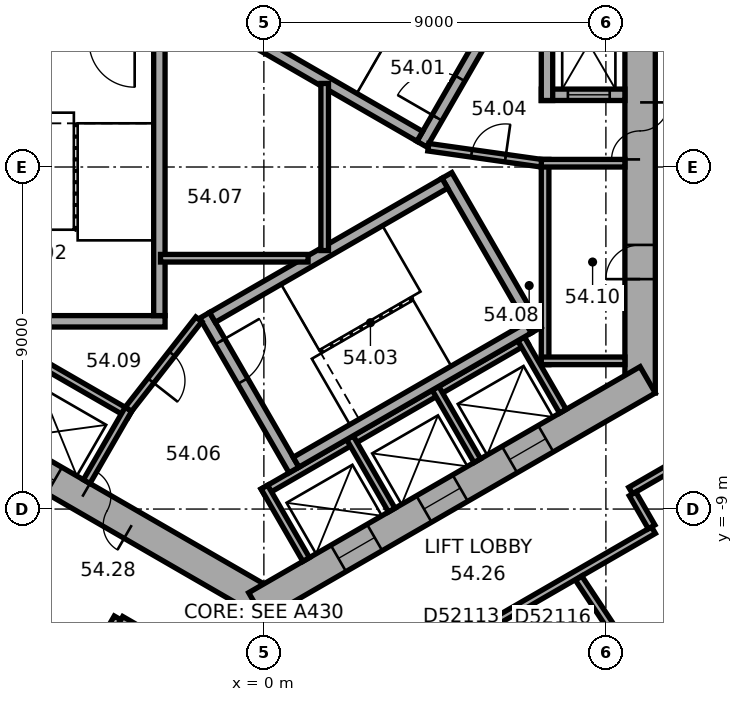
"""IFC4 building model, lengths in metres.
Left out: names, types, materials, properties, quantities, classifications, styles, units other than length and angle.
Written with IfcOpenShell. Run it as: python <this file> out.ifc"""

import sys

from ifc_helpers import new_model, si_unit, direction, frame, frame_2d, origin, place, context, subcontext, project, spatial, rectangle, extrude, element, fill, save


model = new_model("IFC4")
c1 = context("Model", 3, precision=1e-05, world=origin(), true_north=direction((0.0, 1.0)))
c2 = subcontext(c1, "Body", "Model", "MODEL_VIEW")
j1 = project(units=[si_unit("LENGTHUNIT", "METRE"), si_unit("PLANEANGLEUNIT", "RADIAN")], contexts=[c1])
p1 = place(None, origin())
s1 = spatial("IfcSite", under=j1, at=p1, CompositionType="ELEMENT")
p2 = place(p1, origin())
s2 = spatial("IfcBuilding", under=s1, at=p2, CompositionType="ELEMENT")
p3 = place(p2, frame((0.0, 0.0, 221.7)))
s3 = spatial("IfcBuildingStorey", under=s2, at=p3, CompositionType="ELEMENT", Elevation=221.7)
p4 = place(p3, frame((9.9, -5.947, 0.0), z_axis=(0.0, 0.0, 1.0), x_axis=(0.0, 1.0, 0.0)))
e1 = element("IfcWall", 1, at=p4, inside=s3, PredefinedType="SHEAR", context=c2, shape_type="SweptSolid", body=[
    extrude(rectangle(XDim=11.894, YDim=0.8, at=frame_2d((5.947, 0.0))), origin(), (0.0, 0.0, 1.0), 3.7),
])
p5 = place(p4, frame((6.147, 0.0, 0.0)))
e2 = element("IfcOpeningElement", 2, at=p5, cuts=e1, PredefinedType="OPENING", context=c2, shape_type="SweptSolid", body=[
    extrude(rectangle(XDim=1.5, YDim=2.1, at=frame_2d((0.75, 1.05))), frame((0.0, 0.41, 0.0), z_axis=(0.0, -1.0, 0.0), x_axis=(1.0, 0.0, 0.0)), (0.0, 0.0, 1.0), 0.82),
])
p6 = place(p4, frame((2.997, 0.0, 0.0)))
e3 = element("IfcOpeningElement", 3, at=p6, cuts=e1, PredefinedType="OPENING", context=c2, shape_type="SweptSolid", body=[
    extrude(rectangle(XDim=0.9, YDim=2.1, at=frame_2d((0.45, 1.05))), frame((0.0, 0.41, 0.0), z_axis=(0.0, -1.0, 0.0), x_axis=(1.0, 0.0, 0.0)), (0.0, 0.0, 1.0), 0.82),
])
p7 = place(p3, frame((-10.1, -5.6, 0.0), z_axis=(0.0, 0.0, 1.0), x_axis=(0.866023897231, -0.500002609418, 0.0)))
e4 = element("IfcWall", 4, at=p7, inside=s3, PredefinedType="SHEAR", context=c2, shape_type="SweptSolid", body=[
    extrude(rectangle(XDim=11.894, YDim=0.8, at=frame_2d((5.947, 0.0))), origin(), (0.0, 0.0, 1.0), 3.7),
])
p8 = place(p7, frame((6.147, 0.0, 0.0)))
e5 = element("IfcOpeningElement", 5, at=p8, cuts=e4, PredefinedType="OPENING", context=c2, shape_type="SweptSolid", body=[
    extrude(rectangle(XDim=1.5, YDim=2.1, at=frame_2d((0.75, 1.05))), frame((0.0, 0.41, 0.0), z_axis=(0.0, -1.0, 0.0), x_axis=(1.0, 0.0, 0.0)), (0.0, 0.0, 1.0), 0.82),
])
p9 = place(p7, frame((1.597, 0.0, 0.0)))
e6 = element("IfcOpeningElement", 6, at=p9, cuts=e4, PredefinedType="OPENING", context=c2, shape_type="SweptSolid", body=[
    extrude(rectangle(XDim=1.1, YDim=2.1, at=frame_2d((0.55, 1.05))), frame((0.0, 0.41, 0.0), z_axis=(0.0, -1.0, 0.0), x_axis=(1.0, 0.0, 0.0)), (0.0, 0.0, 1.0), 0.82),
])
p10 = place(p7, frame((4.197, 0.0, 0.0)))
e7 = element("IfcOpeningElement", 7, at=p10, cuts=e4, PredefinedType="OPENING", context=c2, shape_type="SweptSolid", body=[
    extrude(rectangle(XDim=1.1, YDim=2.1, at=frame_2d((0.55, 1.05))), frame((0.0, 0.41, 0.0), z_axis=(0.0, -1.0, 0.0), x_axis=(1.0, 0.0, 0.0)), (0.0, 0.0, 1.0), 0.82),
])
p11 = place(p3, frame((-0.2, -11.547, 0.0), z_axis=(0.0, 0.0, 1.0), x_axis=(0.866023897231, 0.500002609418, 0.0)))
e8 = element("IfcWall", 8, at=p11, inside=s3, PredefinedType="SHEAR", context=c2, shape_type="SweptSolid", body=[
    extrude(rectangle(XDim=11.894, YDim=0.8, at=frame_2d((5.947, 0.0))), origin(), (0.0, 0.0, 1.0), 3.7),
])
p12 = place(p11, frame((2.497, 0.0, 0.0)))
e9 = element("IfcOpeningElement", 9, at=p12, cuts=e8, PredefinedType="OPENING", context=c2, shape_type="SweptSolid", body=[
    extrude(rectangle(XDim=1.1, YDim=2.1, at=frame_2d((0.55, 1.05))), frame((0.0, 0.41, 0.0), z_axis=(0.0, -1.0, 0.0), x_axis=(1.0, 0.0, 0.0)), (0.0, 0.0, 1.0), 0.82),
])
p13 = place(p11, frame((5.097, 0.0, 0.0)))
e10 = element("IfcOpeningElement", 10, at=p13, cuts=e8, PredefinedType="OPENING", context=c2, shape_type="SweptSolid", body=[
    extrude(rectangle(XDim=1.1, YDim=2.1, at=frame_2d((0.55, 1.05))), frame((0.0, 0.41, 0.0), z_axis=(0.0, -1.0, 0.0), x_axis=(1.0, 0.0, 0.0)), (0.0, 0.0, 1.0), 0.82),
])
p14 = place(p11, frame((7.697, 0.0, 0.0)))
e11 = element("IfcOpeningElement", 11, at=p14, cuts=e8, PredefinedType="OPENING", context=c2, shape_type="SweptSolid", body=[
    extrude(rectangle(XDim=1.1, YDim=2.1, at=frame_2d((0.55, 1.05))), frame((0.0, 0.41, 0.0), z_axis=(0.0, -1.0, 0.0), x_axis=(1.0, 0.0, 0.0)), (0.0, 0.0, 1.0), 0.82),
])
p15 = place(p3, frame((7.4, -5.2, 0.0), z_axis=(0.0, 0.0, 1.0), x_axis=(0.0, 1.0, 0.0)))
e12 = element("IfcWall", 12, at=p15, inside=s3, PredefinedType="PARTITIONING", context=c2, shape_type="SweptSolid", body=[
    extrude(rectangle(XDim=5.4, YDim=0.2, at=frame_2d((2.7, 0.0))), origin(), (0.0, 0.0, 1.0), 3.42),
])
for number, where, z_axis, x_axis in (
    (13, (7.3, -5.1, 0.0), (0.0, 0.0, 1.0), (1.0, 0.0, 0.0)),
    (14, (7.3, 0.1, 0.0), (0.0, 0.0, 1.0), (1.0, 0.0, 0.0)),
):
    element("IfcWall", number, at=place(p3, frame(where, z_axis=z_axis, x_axis=x_axis)), inside=s3, PredefinedType="PARTITIONING", context=c2, shape_type="SweptSolid", body=[
        extrude(rectangle(XDim=2.2, YDim=0.2, at=frame_2d((1.1, 0.0))), origin(), (0.0, 0.0, 1.0), 3.42),
    ])
p16 = place(p3, frame((-8.203, -3.809, 0.0), z_axis=(0.0, 0.0, 1.0), x_axis=(0.866028230842, -0.499995103361, 0.0)))
e15 = element("IfcWall", 15, at=p16, inside=s3, PredefinedType="PARTITIONING", context=c2, shape_type="SweptSolid", body=[
    extrude(rectangle(XDim=5.4, YDim=0.2, at=frame_2d((2.7, 0.0))), origin(), (0.0, 0.0, 1.0), 3.42),
])
p17 = place(p3, frame((-3.563, -6.372, 0.0), z_axis=(0.0, 0.0, 1.0), x_axis=(-0.499994660107, -0.866028486751, 0.0)))
e16 = element("IfcWall", 16, at=p17, inside=s3, PredefinedType="PARTITIONING", context=c2, shape_type="SweptSolid", body=[
    extrude(rectangle(XDim=2.2, YDim=0.2, at=frame_2d((1.1, 0.0))), origin(), (0.0, 0.0, 1.0), 3.42),
])
p18 = place(p3, frame((-0.024, -8.559, 0.0), z_axis=(0.0, 0.0, 1.0), x_axis=(0.866026010844, 0.49999894854, 0.0)))
e17 = element("IfcWall", 17, at=p18, inside=s3, PredefinedType="PARTITIONING", context=c2, shape_type="SweptSolid", body=[
    extrude(rectangle(XDim=8.0, YDim=0.2, at=frame_2d((4.0, 0.0))), origin(), (0.0, 0.0, 1.0), 3.42),
])
for number, where, z_axis, x_axis in (
    (18, (0.013, -8.422, 0.0), (0.0, 0.0, 1.0), (0.5, -0.866, 0.0)),
    (19, (2.264, -7.122, 0.0), (0.0, 0.0, 1.0), (0.5, -0.866, 0.0)),
    (20, (4.516, -5.822, 0.0), (0.0, 0.0, 1.0), (0.5, -0.866, 0.0)),
    (21, (6.768, -4.522, 0.0), (0.0, 0.0, 1.0), (0.5, -0.866, 0.0)),
):
    element("IfcWall", number, at=place(p3, frame(where, z_axis=z_axis, x_axis=x_axis)), inside=s3, PredefinedType="PARTITIONING", context=c2, shape_type="SweptSolid", body=[
        extrude(rectangle(XDim=2.2, YDim=0.2, at=frame_2d((1.1, 0.0))), origin(), (0.0, 0.0, 1.0), 3.42),
    ])
p19 = place(p3, frame((4.158, 0.602, 0.0), z_axis=(0.0, 0.0, 1.0), x_axis=(0.499977259774, 0.866038532462, 0.0)))
e22 = element("IfcWall", 22, at=p19, inside=s3, PredefinedType="SHEAR", context=c2, shape_type="SweptSolid", body=[
    extrude(rectangle(XDim=4.7, YDim=0.3, at=frame_2d((2.35, 0.0))), origin(), (0.0, 0.0, 1.0), 3.42),
])
p20 = place(p19, frame((0.8, 0.0, 0.0)))
e23 = element("IfcOpeningElement", 23, at=p20, cuts=e22, PredefinedType="OPENING", context=c2, shape_type="SweptSolid", body=[
    extrude(rectangle(XDim=1.2, YDim=2.1, at=frame_2d((0.6, 1.05))), frame((0.0, 0.16, 0.0), z_axis=(0.0, -1.0, 0.0), x_axis=(1.0, 0.0, 0.0)), (0.0, 0.0, 1.0), 0.32),
])
p21 = place(p3, frame((4.103, 0.807, 0.0), z_axis=(0.0, 0.0, 1.0), x_axis=(-0.866027801685, 0.499995846692, 0.0)))
e24 = element("IfcWall", 24, at=p21, inside=s3, PredefinedType="SHEAR", context=c2, shape_type="SweptSolid", body=[
    extrude(rectangle(XDim=7.06, YDim=0.3, at=frame_2d((3.53, 0.0))), origin(), (0.0, 0.0, 1.0), 3.42),
])
p22 = place(p3, frame((-2.6, -4.06, 0.0), z_axis=(0.0, 0.0, 1.0), x_axis=(-1.0, 0.0, 0.0)))
e25 = element("IfcWall", 25, at=p22, inside=s3, PredefinedType="SHEAR", context=c2, shape_type="SweptSolid", body=[
    extrude(rectangle(XDim=4.7, YDim=0.3, at=frame_2d((2.35, 0.0))), origin(), (0.0, 0.0, 1.0), 3.42),
])
p23 = place(p3, frame((-2.75, 3.15, 0.0), z_axis=(0.0, 0.0, 1.0), x_axis=(0.0, -1.0, 0.0)))
e26 = element("IfcWall", 26, at=p23, inside=s3, PredefinedType="SHEAR", context=c2, shape_type="SweptSolid", body=[
    extrude(rectangle(XDim=7.06, YDim=0.3, at=frame_2d((3.53, 0.0))), origin(), (0.0, 0.0, 1.0), 3.42),
])
p24 = place(p3, frame((-1.558, -3.902, 0.0), z_axis=(0.0, 0.0, 1.0), x_axis=(0.499977259774, -0.866038532462, 0.0)))
e27 = element("IfcWall", 27, at=p24, inside=s3, PredefinedType="SHEAR", context=c2, shape_type="SweptSolid", body=[
    extrude(rectangle(XDim=4.7, YDim=0.3, at=frame_2d((2.35, 0.0))), origin(), (0.0, 0.0, 1.0), 3.42),
])
p25 = place(p24, frame((0.8, 0.0, 0.0)))
e28 = element("IfcOpeningElement", 28, at=p25, cuts=e27, PredefinedType="OPENING", context=c2, shape_type="SweptSolid", body=[
    extrude(rectangle(XDim=1.2, YDim=2.1, at=frame_2d((0.6, 1.05))), frame((0.0, 0.16, 0.0), z_axis=(0.0, -1.0, 0.0), x_axis=(1.0, 0.0, 0.0)), (0.0, 0.0, 1.0), 0.32),
])
p26 = place(p3, frame((4.816, -0.222, 0.0), z_axis=(0.0, 0.0, 1.0), x_axis=(0.499977259774, -0.866038532462, 0.0)))
e29 = element("IfcWall", 29, at=p26, inside=s3, PredefinedType="SHEAR", context=c2, shape_type="SweptSolid", body=[
    extrude(rectangle(XDim=4.7, YDim=0.3, at=frame_2d((2.35, 0.0))), origin(), (0.0, 0.0, 1.0), 3.42),
])
for number, where, z_axis, x_axis in (
    (30, (-1.353, -3.957, 0.0), (0.0, 0.0, 1.0), (0.866, 0.5, 0.0)),
    (31, (0.847, -7.767, 0.0), (0.0, 0.0, 1.0), (0.866, 0.5, 0.0)),
):
    element("IfcWall", number, at=place(p3, frame(where, z_axis=z_axis, x_axis=x_axis)), inside=s3, PredefinedType="SHEAR", context=c2, shape_type="SweptSolid", body=[
        extrude(rectangle(XDim=7.06, YDim=0.3, at=frame_2d((3.53, 0.0))), origin(), (0.0, 0.0, 1.0), 3.42),
    ])
p27 = place(p3, frame((7.3, 1.9, 0.0), z_axis=(0.0, 0.0, 1.0), x_axis=(1.0, 0.0, 0.0)))
e32 = element("IfcWall", 32, at=p27, inside=s3, PredefinedType="SHEAR", context=c2, shape_type="SweptSolid", body=[
    extrude(rectangle(XDim=2.2, YDim=0.3, at=frame_2d((1.1, 0.0))), origin(), (0.0, 0.0, 1.0), 3.42),
])
p28 = place(p27, frame((0.7, 0.0, 0.0)))
e33 = element("IfcOpeningElement", 33, at=p28, cuts=e32, PredefinedType="OPENING", context=c2, shape_type="SweptSolid", body=[
    extrude(rectangle(XDim=1.1, YDim=2.1, at=frame_2d((0.55, 1.05))), frame((0.0, 0.16, 0.0), z_axis=(0.0, -1.0, 0.0), x_axis=(1.0, 0.0, 0.0)), (0.0, 0.0, 1.0), 0.32),
])
p29 = place(p3, frame((7.45, 1.75, 0.0), z_axis=(0.0, 0.0, 1.0), x_axis=(0.0, 1.0, 0.0)))
e34 = element("IfcWall", 34, at=p29, inside=s3, PredefinedType="SHEAR", context=c2, shape_type="SweptSolid", body=[
    extrude(rectangle(XDim=3.35, YDim=0.3, at=frame_2d((1.675, 0.0))), origin(), (0.0, 0.0, 1.0), 3.42),
])
p30 = place(p3, frame((4.327, 0.521, 0.0), z_axis=(0.0, 0.0, 1.0), x_axis=(0.990124376366, -0.14019172346, 0.0)))
e35 = element("IfcWall", 35, at=p30, inside=s3, PredefinedType="PARTITIONING", context=c2, shape_type="SweptSolid", body=[
    extrude(rectangle(XDim=3.002, YDim=0.2, at=frame_2d((1.501, 0.0))), origin(), (0.0, 0.0, 1.0), 3.42),
])
p31 = place(p30, frame((1.15, 0.0, 0.0)))
e36 = element("IfcOpeningElement", 36, at=p31, cuts=e35, PredefinedType="OPENING", context=c2, shape_type="SweptSolid", body=[
    extrude(rectangle(XDim=0.9, YDim=2.1, at=frame_2d((0.45, 1.05))), frame((0.0, 0.11, 0.0), z_axis=(0.0, -1.0, 0.0), x_axis=(1.0, 0.0, 0.0)), (0.0, 0.0, 1.0), 0.22),
])
p32 = place(p3, frame((-1.712, -4.008, 0.0), z_axis=(0.0, 0.0, 1.0), x_axis=(-0.616549420702, -0.787316208287, 0.0)))
e37 = element("IfcWall", 37, at=p32, inside=s3, PredefinedType="PARTITIONING", context=c2, shape_type="SweptSolid", body=[
    extrude(rectangle(XDim=3.002, YDim=0.2, at=frame_2d((1.501, 0.0))), origin(), (0.0, 0.0, 1.0), 3.42),
])
p33 = place(p32, frame((1.15, 0.0, 0.0)))
e38 = element("IfcOpeningElement", 38, at=p33, cuts=e37, PredefinedType="OPENING", context=c2, shape_type="SweptSolid", body=[
    extrude(rectangle(XDim=0.9, YDim=2.1, at=frame_2d((0.45, 1.05))), frame((0.0, 0.11, 0.0), z_axis=(0.0, -1.0, 0.0), x_axis=(1.0, 0.0, 0.0)), (0.0, 0.0, 1.0), 0.22),
])
p34 = place(p3, frame((-2.72, -2.4, 0.0), z_axis=(0.0, 0.0, 1.0), x_axis=(1.0, 0.0, 0.0)))
e39 = element("IfcWall", 39, at=p34, inside=s3, PredefinedType="PARTITIONING", context=c2, shape_type="SweptSolid", body=[
    extrude(rectangle(XDim=3.883, YDim=0.2, at=frame_2d((1.941, 0.0))), origin(), (0.0, 0.0, 1.0), 3.42),
])
p35 = place(p3, frame((1.6, -2.198, 0.0), z_axis=(0.0, 0.0, 1.0), x_axis=(0.0, 1.0, 0.0)))
e40 = element("IfcWall", 40, at=p35, inside=s3, PredefinedType="PARTITIONING", context=c2, shape_type="SweptSolid", body=[
    extrude(rectangle(XDim=4.397, YDim=0.2, at=frame_2d((2.198, 0.0))), origin(), (0.0, 0.0, 1.0), 3.42),
])
p36 = place(p3, frame((-7.525, -18.23, 0.0), z_axis=(0.0, 0.0, 1.0), x_axis=(0.499983153418, 0.866035129944, 0.0)))
e41 = element("IfcWall", 41, at=p36, inside=s3, PredefinedType="PARTITIONING", context=c2, shape_type="SweptSolid", body=[
    extrude(rectangle(XDim=7.35, YDim=0.2, at=frame_2d((3.675, 0.0))), origin(), (0.0, 0.0, 1.0), 3.42),
])
p37 = place(p36, frame((3.175, 0.0, 0.0)))
e42 = element("IfcOpeningElement", 42, at=p37, cuts=e41, PredefinedType="OPENING", context=c2, shape_type="SweptSolid", body=[
    extrude(rectangle(XDim=1.0, YDim=2.1, at=frame_2d((0.5, 1.05))), frame((0.0, 0.11, 0.0), z_axis=(0.0, -1.0, 0.0), x_axis=(1.0, 0.0, 0.0)), (0.0, 0.0, 1.0), 0.22),
])
p38 = place(p3, frame((-3.763, -11.915, 0.0), z_axis=(0.0, 0.0, 1.0), x_axis=(0.866037915695, -0.499978328108, 0.0)))
e43 = element("IfcWall", 43, at=p38, inside=s3, PredefinedType="PARTITIONING", context=c2, shape_type="SweptSolid", body=[
    extrude(rectangle(XDim=3.249, YDim=0.2, at=frame_2d((1.625, 0.0))), origin(), (0.0, 0.0, 1.0), 3.42),
])
p39 = place(p3, frame((2.716, -13.906, 0.0), z_axis=(0.0, 0.0, 1.0), x_axis=(0.866040290674, 0.499974214264, 0.0)))
e44 = element("IfcWall", 44, at=p39, inside=s3, PredefinedType="PARTITIONING", context=c2, shape_type="SweptSolid", body=[
    extrude(rectangle(XDim=8.702, YDim=0.2, at=frame_2d((4.351, 0.0))), origin(), (0.0, 0.0, 1.0), 3.42),
])
p40 = place(p39, frame((2.679, 0.0, 0.0)))
e45 = element("IfcOpeningElement", 45, at=p40, cuts=e44, PredefinedType="OPENING", context=c2, shape_type="SweptSolid", body=[
    extrude(rectangle(XDim=1.0, YDim=2.1, at=frame_2d((0.5, 1.05))), frame((0.0, 0.11, 0.0), z_axis=(0.0, -1.0, 0.0), x_axis=(1.0, 0.0, 0.0)), (0.0, 0.0, 1.0), 0.22),
])
p41 = place(p3, frame((9.652, -8.515, 0.0), z_axis=(0.0, 0.0, 1.0), x_axis=(0.866020375458, 0.500008709215, 0.0)))
e46 = element("IfcWall", 46, at=p41, inside=s3, PredefinedType="PARTITIONING", context=c2, shape_type="SweptSolid", body=[
    extrude(rectangle(XDim=1.846, YDim=0.2, at=frame_2d((0.923, 0.0))), origin(), (0.0, 0.0, 1.0), 3.42),
])
p42 = place(p3, frame((10.202, -9.469, 0.0), z_axis=(0.0, 0.0, 1.0), x_axis=(-0.499968756647, 0.866043441391, 0.0)))
e47 = element("IfcWall", 47, at=p42, inside=s3, PredefinedType="PARTITIONING", context=c2, shape_type="SweptSolid", body=[
    extrude(rectangle(XDim=1.001, YDim=0.2, at=frame_2d((0.5, 0.0))), origin(), (0.0, 0.0, 1.0), 3.42),
])
p43 = place(p3, frame((11.571, -15.786, 0.0), z_axis=(0.0, 0.0, 1.0), x_axis=(-0.551944861763, 0.833880608705, 0.0)))
e48 = element("IfcWall", 48, at=p43, inside=s3, PredefinedType="PARTITIONING", context=c2, shape_type="SweptSolid", body=[
    extrude(rectangle(XDim=5.957, YDim=0.2, at=frame_2d((2.979, 0.0))), origin(), (0.0, 0.0, 1.0), 3.42),
])
p44 = place(p5, origin())
e49 = element("IfcDoor", 49, at=p44, inside=s3, OperationType="DOUBLE_DOOR_SINGLE_SWING", PredefinedType="DOOR", context=c2, shape_type="SweptSolid", body=[
    extrude(rectangle(XDim=1.5, YDim=2.1, at=frame_2d((0.75, 1.05))), frame((0.0, 0.025, 0.0), z_axis=(0.0, -1.0, 0.0), x_axis=(1.0, 0.0, 0.0)), (0.0, 0.0, 1.0), 0.05),
])
fill(e2, e49)
p45 = place(p8, origin())
e50 = element("IfcDoor", 50, at=p45, inside=s3, OperationType="DOUBLE_DOOR_SINGLE_SWING", PredefinedType="DOOR", context=c2, shape_type="SweptSolid", body=[
    extrude(rectangle(XDim=1.5, YDim=2.1, at=frame_2d((0.75, 1.05))), frame((0.0, 0.025, 0.0), z_axis=(0.0, -1.0, 0.0), x_axis=(1.0, 0.0, 0.0)), (0.0, 0.0, 1.0), 0.05),
])
fill(e5, e50)
p46 = place(p20, origin())
e51 = element("IfcDoor", 51, at=p46, inside=s3, OperationType="SINGLE_SWING_RIGHT", PredefinedType="DOOR", context=c2, shape_type="SweptSolid", body=[
    extrude(rectangle(XDim=1.2, YDim=2.1, at=frame_2d((0.6, 1.05))), frame((0.0, 0.025, 0.0), z_axis=(0.0, -1.0, 0.0), x_axis=(1.0, 0.0, 0.0)), (0.0, 0.0, 1.0), 0.05),
])
fill(e23, e51)
p47 = place(p25, origin())
e52 = element("IfcDoor", 52, at=p47, inside=s3, OperationType="SINGLE_SWING_RIGHT", PredefinedType="DOOR", context=c2, shape_type="SweptSolid", body=[
    extrude(rectangle(XDim=1.2, YDim=2.1, at=frame_2d((0.6, 1.05))), frame((0.0, 0.025, 0.0), z_axis=(0.0, -1.0, 0.0), x_axis=(1.0, 0.0, 0.0)), (0.0, 0.0, 1.0), 0.05),
])
fill(e28, e52)
p48 = place(p31, origin())
e53 = element("IfcDoor", 53, at=p48, inside=s3, OperationType="SINGLE_SWING_LEFT", PredefinedType="DOOR", context=c2, shape_type="SweptSolid", body=[
    extrude(rectangle(XDim=0.9, YDim=2.1, at=frame_2d((0.45, 1.05))), frame((0.0, 0.025, 0.0), z_axis=(0.0, -1.0, 0.0), x_axis=(1.0, 0.0, 0.0)), (0.0, 0.0, 1.0), 0.05),
])
fill(e36, e53)
p49 = place(p33, origin())
e54 = element("IfcDoor", 54, at=p49, inside=s3, OperationType="SINGLE_SWING_LEFT", PredefinedType="DOOR", context=c2, shape_type="SweptSolid", body=[
    extrude(rectangle(XDim=0.9, YDim=2.1, at=frame_2d((0.45, 1.05))), frame((0.0, 0.025, 0.0), z_axis=(0.0, -1.0, 0.0), x_axis=(1.0, 0.0, 0.0)), (0.0, 0.0, 1.0), 0.05),
])
fill(e38, e54)
p50 = place(p6, origin())
e55 = element("IfcDoor", 55, at=p50, inside=s3, OperationType="SINGLE_SWING_LEFT", PredefinedType="DOOR", context=c2, shape_type="SweptSolid", body=[
    extrude(rectangle(XDim=0.9, YDim=2.1, at=frame_2d((0.45, 1.05))), frame((0.0, 0.025, 0.0), z_axis=(0.0, -1.0, 0.0), x_axis=(1.0, 0.0, 0.0)), (0.0, 0.0, 1.0), 0.05),
])
fill(e3, e55)
p51 = place(p28, origin())
e56 = element("IfcDoor", 56, at=p51, inside=s3, OperationType="DOUBLE_DOOR_SLIDING", PredefinedType="DOOR", context=c2, shape_type="SweptSolid", body=[
    extrude(rectangle(XDim=1.1, YDim=2.1, at=frame_2d((0.55, 1.05))), frame((0.0, 0.025, 0.0), z_axis=(0.0, -1.0, 0.0), x_axis=(1.0, 0.0, 0.0)), (0.0, 0.0, 1.0), 0.05),
])
fill(e33, e56)
p52 = place(p10, origin())
e57 = element("IfcDoor", 57, at=p52, inside=s3, OperationType="DOUBLE_DOOR_SLIDING", PredefinedType="DOOR", context=c2, shape_type="SweptSolid", body=[
    extrude(rectangle(XDim=1.1, YDim=2.1, at=frame_2d((0.55, 1.05))), frame((0.0, 0.025, 0.0), z_axis=(0.0, -1.0, 0.0), x_axis=(1.0, 0.0, 0.0)), (0.0, 0.0, 1.0), 0.05),
])
fill(e7, e57)
p53 = place(p12, origin())
e58 = element("IfcDoor", 58, at=p53, inside=s3, OperationType="DOUBLE_DOOR_SLIDING", PredefinedType="DOOR", context=c2, shape_type="SweptSolid", body=[
    extrude(rectangle(XDim=1.1, YDim=2.1, at=frame_2d((0.55, 1.05))), frame((0.0, 0.025, 0.0), z_axis=(0.0, -1.0, 0.0), x_axis=(1.0, 0.0, 0.0)), (0.0, 0.0, 1.0), 0.05),
])
fill(e9, e58)
p54 = place(p13, origin())
e59 = element("IfcDoor", 59, at=p54, inside=s3, OperationType="DOUBLE_DOOR_SLIDING", PredefinedType="DOOR", context=c2, shape_type="SweptSolid", body=[
    extrude(rectangle(XDim=1.1, YDim=2.1, at=frame_2d((0.55, 1.05))), frame((0.0, 0.025, 0.0), z_axis=(0.0, -1.0, 0.0), x_axis=(1.0, 0.0, 0.0)), (0.0, 0.0, 1.0), 0.05),
])
fill(e10, e59)
p55 = place(p14, origin())
e60 = element("IfcDoor", 60, at=p55, inside=s3, OperationType="DOUBLE_DOOR_SLIDING", PredefinedType="DOOR", context=c2, shape_type="SweptSolid", body=[
    extrude(rectangle(XDim=1.1, YDim=2.1, at=frame_2d((0.55, 1.05))), frame((0.0, 0.025, 0.0), z_axis=(0.0, -1.0, 0.0), x_axis=(1.0, 0.0, 0.0)), (0.0, 0.0, 1.0), 0.05),
])
fill(e11, e60)
save(model, sys.argv[1])
